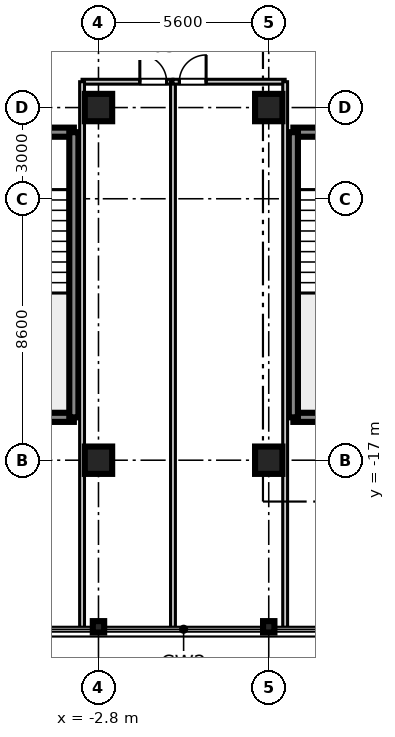
"""IFC4 building model, lengths in metres.
Left out: names, types, materials, properties, quantities, classifications, styles, units other than length and angle.
Written with IfcOpenShell. Run it as: python <this file> out.ifc"""

import sys

from ifc_helpers import new_model, si_unit, direction, frame, frame_2d, origin, origin_2d, place, context, subcontext, project, spatial, rectangle, i_section, extrude, source, transform, mapped, element, fill, save


model = new_model("IFC4")
c1 = context("Model", 3, precision=1e-05, world=origin(), true_north=direction((0.0, 1.0)))
c2 = subcontext(c1, "Body", "Model", "MODEL_VIEW")
j1 = project(units=[si_unit("LENGTHUNIT", "METRE"), si_unit("PLANEANGLEUNIT", "RADIAN")], contexts=[c1])
p1 = place(None, origin())
s1 = spatial("IfcSite", under=j1, at=p1, CompositionType="ELEMENT")
p2 = place(p1, origin())
s2 = spatial("IfcBuilding", under=s1, at=p2, CompositionType="ELEMENT")
p3 = place(p2, frame((0.0, 0.0, 319.55)))
s3 = spatial("IfcBuildingStorey", under=s2, at=p3, CompositionType="ELEMENT", Elevation=319.55)
m1 = source(origin(), c2, "Body", "SweptSolid", [
    extrude(rectangle(XDim=0.9, YDim=0.9, at=origin_2d()), origin(), (0.0, 0.0, 1.0), 3.755),
])
for number, where, z_axis, x_axis in (
    (1, (-2.8, -17.0, 0.0), (0.0, 0.0, 1.0), (1.0, 0.0, 0.0)),
    (2, (-2.8, -5.4, 0.0), (0.0, 0.0, 1.0), (1.0, 0.0, 0.0)),
    (3, (2.8, -17.0, 0.0), (0.0, 0.0, 1.0), (1.0, 0.0, 0.0)),
    (4, (2.8, -5.4, 0.0), (0.0, 0.0, 1.0), (1.0, 0.0, 0.0)),
):
    element("IfcColumn", number, at=place(p3, frame(where, z_axis=z_axis, x_axis=x_axis)), inside=s3, PredefinedType="COLUMN", context=c2, shape_type="MappedRepresentation", body=[
        mapped(m1, transform((0.0, 0.0, 0.0), scale=1.0)),
    ])
m2 = source(origin(), c2, "Body", "SweptSolid", [
    extrude(i_section(OverallWidth=0.374, OverallDepth=0.374, WebThickness=0.014, FlangeThickness=0.023, at=origin_2d()), origin(), (0.0, 0.0, 1.0), 3.755),
])
for number, where, z_axis, x_axis in (
    (5, (-2.8, -22.48, 0.0), (0.0, 0.0, 1.0), (0.0, 1.0, 0.0)),
    (6, (2.8, -22.48, 0.0), (0.0, 0.0, 1.0), (0.0, 1.0, 0.0)),
):
    element("IfcColumn", number, at=place(p3, frame(where, z_axis=z_axis, x_axis=x_axis)), inside=s3, PredefinedType="COLUMN", context=c2, shape_type="MappedRepresentation", body=[
        mapped(m2, transform((0.0, 0.0, 0.0), scale=1.0)),
    ])
m3 = source(origin(), c2, "Body", "SweptSolid", [
    extrude(rectangle(XDim=3.98, YDim=0.3, at=frame_2d((1.99, 0.0))), origin(), (0.0, 0.0, 1.0), 3.5),
])
for number, where, z_axis, x_axis in (
    (7, (3.61, -15.59, 0.0), (0.0, 0.0, 1.0), (1.0, 0.0, 0.0)),
    (8, (3.61, -6.21, 0.0), (0.0, 0.0, 1.0), (1.0, 0.0, 0.0)),
):
    element("IfcWall", number, at=place(p3, frame(where, z_axis=z_axis, x_axis=x_axis)), inside=s3, PredefinedType="SHEAR", context=c2, shape_type="MappedRepresentation", body=[
        mapped(m3, transform((0.0, 0.0, 0.0), scale=1.0)),
    ])
m4 = source(origin(), c2, "Body", "SweptSolid", [
    extrude(rectangle(XDim=9.38, YDim=0.3, at=frame_2d((4.69, 0.0))), origin(), (0.0, 0.0, 1.0), 3.5),
])
p4 = place(p3, frame((3.61, -15.59, 0.0), z_axis=(0.0, 0.0, 1.0), x_axis=(0.0, 1.0, 0.0)))
e9 = element("IfcWall", 9, at=p4, inside=s3, PredefinedType="SHEAR", context=c2, shape_type="MappedRepresentation", body=[
    mapped(m4, transform((0.0, 0.0, 0.0), scale=1.0)),
])
p5 = place(p3, frame((-7.59, -15.59, 0.0), z_axis=(0.0, 0.0, 1.0), x_axis=(1.0, 0.0, 0.0)))
e10 = element("IfcWall", 10, at=p5, inside=s3, PredefinedType="SHEAR", context=c2, shape_type="MappedRepresentation", body=[
    mapped(m3, transform((0.0, 0.0, 0.0), scale=1.0)),
])
p6 = place(p3, frame((-7.59, -6.21, 0.0), z_axis=(0.0, 0.0, 1.0), x_axis=(1.0, 0.0, 0.0)))
e11 = element("IfcWall", 11, at=p6, inside=s3, PredefinedType="SHEAR", context=c2, shape_type="MappedRepresentation", body=[
    mapped(m3, transform((0.0, 0.0, 0.0), scale=1.0)),
])
p7 = place(p6, frame((1.44, 0.0, 0.0)))
e12 = element("IfcOpeningElement", 12, at=p7, cuts=e11, PredefinedType="OPENING", context=c2, shape_type="SweptSolid", body=[
    extrude(rectangle(XDim=1.1, YDim=2.15, at=frame_2d((0.55, 1.075))), frame((0.0, 0.16, 0.0), z_axis=(0.0, -1.0, 0.0), x_axis=(1.0, 0.0, 0.0)), (0.0, 0.0, 1.0), 0.32),
])
p8 = place(p3, frame((-3.61, -15.59, 0.0), z_axis=(0.0, 0.0, 1.0), x_axis=(0.0, 1.0, 0.0)))
e13 = element("IfcWall", 13, at=p8, inside=s3, PredefinedType="SHEAR", context=c2, shape_type="MappedRepresentation", body=[
    mapped(m4, transform((0.0, 0.0, 0.0), scale=1.0)),
])
m5 = source(origin(), c2, "Body", "SweptSolid", [
    extrude(rectangle(XDim=2.99, YDim=0.16, at=frame_2d((1.495, 0.0))), origin(), (0.0, 0.0, 1.0), 2.84),
])
p9 = place(p3, frame((-3.34, -4.55, 0.0), z_axis=(0.0, 0.0, 1.0), x_axis=(1.0, 0.0, 0.0)))
e14 = element("IfcWall", 14, at=p9, inside=s3, PredefinedType="PARTITIONING", context=c2, shape_type="MappedRepresentation", body=[
    mapped(m5, transform((0.0, 0.0, 0.0), scale=1.0)),
])
p10 = place(p9, frame((1.9, 0.0, 0.0)))
e15 = element("IfcOpeningElement", 15, at=p10, cuts=e14, PredefinedType="OPENING", context=c2, shape_type="SweptSolid", body=[
    extrude(rectangle(XDim=0.88, YDim=2.1, at=frame_2d((0.44, 1.05))), frame((0.0, 0.09, 0.0), z_axis=(0.0, -1.0, 0.0), x_axis=(1.0, 0.0, 0.0)), (0.0, 0.0, 1.0), 0.18),
])
m6 = source(origin(), c2, "Body", "SweptSolid", [
    extrude(rectangle(XDim=17.95, YDim=0.16, at=frame_2d((8.975, 0.0))), origin(), (0.0, 0.0, 1.0), 2.84),
])
for number, where, z_axis, x_axis in (
    (16, (-3.34, -22.5, 0.0), (0.0, 0.0, 1.0), (0.0, 1.0, 0.0)),
    (17, (-0.35, -22.5, 0.0), (0.0, 0.0, 1.0), (0.0, 1.0, 0.0)),
):
    element("IfcWall", number, at=place(p3, frame(where, z_axis=z_axis, x_axis=x_axis)), inside=s3, PredefinedType="PARTITIONING", context=c2, shape_type="MappedRepresentation", body=[
        mapped(m6, transform((0.0, 0.0, 0.0), scale=1.0)),
    ])
m7 = source(origin(), c2, "Body", "SweptSolid", [
    extrude(rectangle(XDim=3.69, YDim=0.16, at=frame_2d((1.845, 0.0))), origin(), (0.0, 0.0, 1.0), 2.84),
])
p11 = place(p3, frame((-0.35, -4.55, 0.0), z_axis=(0.0, 0.0, 1.0), x_axis=(1.0, 0.0, 0.0)))
e18 = element("IfcWall", 18, at=p11, inside=s3, PredefinedType="PARTITIONING", context=c2, shape_type="MappedRepresentation", body=[
    mapped(m7, transform((0.0, 0.0, 0.0), scale=1.0)),
])
p12 = place(p11, frame((0.21, 0.0, 0.0)))
e19 = element("IfcOpeningElement", 19, at=p12, cuts=e18, PredefinedType="OPENING", context=c2, shape_type="SweptSolid", body=[
    extrude(rectangle(XDim=0.88, YDim=2.1, at=frame_2d((0.44, 1.05))), frame((0.0, 0.09, 0.0), z_axis=(0.0, -1.0, 0.0), x_axis=(1.0, 0.0, 0.0)), (0.0, 0.0, 1.0), 0.18),
])
p13 = place(p3, frame((3.34, -22.5, 0.0), z_axis=(0.0, 0.0, 1.0), x_axis=(0.0, 1.0, 0.0)))
e20 = element("IfcWall", 20, at=p13, inside=s3, PredefinedType="PARTITIONING", context=c2, shape_type="MappedRepresentation", body=[
    mapped(m6, transform((0.0, 0.0, 0.0), scale=1.0)),
])
m8 = source(origin(), c2, "Body", "SweptSolid", [
    extrude(rectangle(XDim=0.88, YDim=2.1, at=frame_2d((0.44, 1.05))), frame((0.0, 0.025, 0.0), z_axis=(0.0, -1.0, 0.0), x_axis=(1.0, 0.0, 0.0)), (0.0, 0.0, 1.0), 0.05),
])
p14 = place(p10, frame((0.88, 0.0, 0.0), z_axis=(0.0, 0.0, 1.0), x_axis=(-1.0, 0.0, 0.0)))
e21 = element("IfcDoor", 21, at=p14, inside=s3, OperationType="SINGLE_SWING_LEFT", PredefinedType="DOOR", context=c2, shape_type="MappedRepresentation", body=[
    mapped(m8, transform((0.0, 0.0, 0.0), scale=1.0)),
])
fill(e15, e21)
p15 = place(p12, frame((0.88, 0.0, 0.0), z_axis=(0.0, 0.0, 1.0), x_axis=(-1.0, 0.0, 0.0)))
e22 = element("IfcDoor", 22, at=p15, inside=s3, OperationType="SINGLE_SWING_RIGHT", PredefinedType="DOOR", context=c2, shape_type="MappedRepresentation", body=[
    mapped(m8, transform((0.0, 0.0, 0.0), scale=1.0)),
])
fill(e19, e22)
save(model, sys.argv[1])
